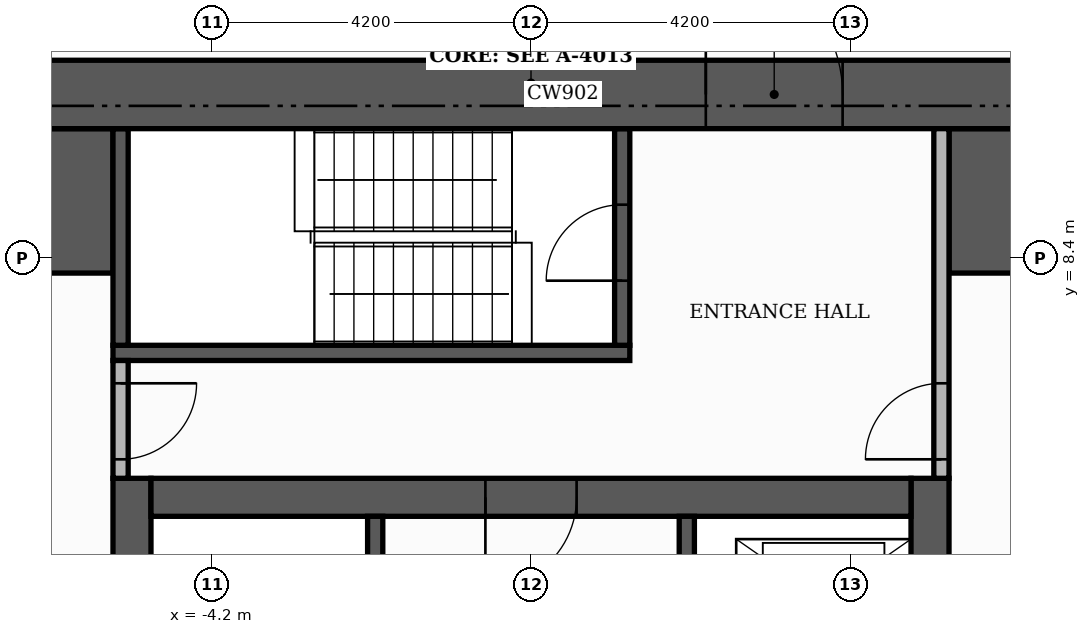
"""IFC4 building model, lengths in metres.
Left out: names, types, materials, properties, quantities, classifications, styles, units other than length and angle.
Written with IfcOpenShell. Run it as: python <this file> out.ifc"""

import sys

from ifc_helpers import new_model, si_unit, direction, frame, frame_2d, origin, place, context, subcontext, project, spatial, rectangle, extrude, element, fill, save


model = new_model("IFC4")
c1 = context("Model", 3, precision=1e-05, world=origin(), true_north=direction((0.0, 1.0)))
c2 = subcontext(c1, "Body", "Model", "MODEL_VIEW")
j1 = project(units=[si_unit("LENGTHUNIT", "METRE"), si_unit("PLANEANGLEUNIT", "RADIAN")], contexts=[c1])
p1 = place(None, origin())
s1 = spatial("IfcSite", under=j1, at=p1, CompositionType="ELEMENT")
p2 = place(p1, origin())
s2 = spatial("IfcBuilding", under=s1, at=p2, CompositionType="ELEMENT")
p3 = place(p2, frame((0.0, 0.0, 83.1)))
s3 = spatial("IfcBuildingStorey", under=s2, at=p3, CompositionType="ELEMENT", Elevation=83.1)
for number, where, z_axis, x_axis in (
    (1, (-5.25, -5.0, 0.0), (0.0, 0.0, 1.0), (0.0, 1.0, 0.0)),
    (2, (5.25, -5.0, 0.0), (0.0, 0.0, 1.0), (0.0, 1.0, 0.0)),
):
    element("IfcWall", number, at=place(p3, frame(where, z_axis=z_axis, x_axis=x_axis)), inside=s3, PredefinedType="SHEAR", context=c2, shape_type="SweptSolid", body=[
        extrude(rectangle(XDim=10.5, YDim=0.5, at=frame_2d((5.25, 0.0))), origin(), (0.0, 0.0, 1.0), 3.48),
    ])
p4 = place(p3, frame((-5.0, 5.25, 0.0), z_axis=(0.0, 0.0, 1.0), x_axis=(1.0, 0.0, 0.0)))
e3 = element("IfcWall", 3, at=p4, inside=s3, PredefinedType="SHEAR", context=c2, shape_type="SweptSolid", body=[
    extrude(rectangle(XDim=10.0, YDim=0.5, at=frame_2d((5.0, 0.0))), origin(), (0.0, 0.0, 1.0), 3.48),
])
p5 = place(p4, frame((4.4, 0.0, 0.0)))
e4 = element("IfcOpeningElement", 4, at=p5, cuts=e3, PredefinedType="OPENING", context=c2, shape_type="SweptSolid", body=[
    extrude(rectangle(XDim=1.2, YDim=2.1, at=frame_2d((0.6, 1.05))), frame((0.0, 0.26, 0.0), z_axis=(0.0, -1.0, 0.0), x_axis=(1.0, 0.0, 0.0)), (0.0, 0.0, 1.0), 0.52),
])
for number, where, z_axis, x_axis in (
    (5, (-10.1, 9.15, 0.0), (0.0, 0.0, 1.0), (1.0, 0.0, 0.0)),
    (6, (5.5, 9.15, 0.0), (0.0, 0.0, 1.0), (1.0, 0.0, 0.0)),
):
    element("IfcWall", number, at=place(p3, frame(where, z_axis=z_axis, x_axis=x_axis)), inside=s3, PredefinedType="SHEAR", context=c2, shape_type="SweptSolid", body=[
        extrude(rectangle(XDim=4.6, YDim=1.9, at=frame_2d((2.3, 0.0))), origin(), (0.0, 0.0, 1.0), 3.48),
    ])
p6 = place(p3, frame((-2.05, -1.4, 0.0), z_axis=(0.0, 0.0, 1.0), x_axis=(0.0, 1.0, 0.0)))
e7 = element("IfcWall", 7, at=p6, inside=s3, PredefinedType="SHEAR", context=c2, shape_type="SweptSolid", body=[
    extrude(rectangle(XDim=6.4, YDim=0.2, at=frame_2d((3.2, 0.0))), origin(), (0.0, 0.0, 1.0), 3.48),
])
p7 = place(p6, frame((0.15, 0.0, 0.0)))
e8 = element("IfcOpeningElement", 8, at=p7, cuts=e7, PredefinedType="OPENING", context=c2, shape_type="SweptSolid", body=[
    extrude(rectangle(XDim=1.0, YDim=2.1, at=frame_2d((0.5, 1.05))), frame((0.0, 0.11, 0.0), z_axis=(0.0, -1.0, 0.0), x_axis=(1.0, 0.0, 0.0)), (0.0, 0.0, 1.0), 0.22),
])
p8 = place(p3, frame((-5.5, 7.15, 0.0), z_axis=(0.0, 0.0, 1.0), x_axis=(1.0, 0.0, 0.0)))
e9 = element("IfcWall", 9, at=p8, inside=s3, PredefinedType="SHEAR", context=c2, shape_type="SweptSolid", body=[
    extrude(rectangle(XDim=6.8, YDim=0.2, at=frame_2d((3.4, 0.0))), origin(), (0.0, 0.0, 1.0), 3.48),
])
p9 = place(p3, frame((-5.4, 7.25, 0.0), z_axis=(0.0, 0.0, 1.0), x_axis=(0.0, 1.0, 0.0)))
e10 = element("IfcWall", 10, at=p9, inside=s3, PredefinedType="SHEAR", context=c2, shape_type="SweptSolid", body=[
    extrude(rectangle(XDim=2.85, YDim=0.2, at=frame_2d((1.425, 0.0))), origin(), (0.0, 0.0, 1.0), 3.48),
])
p10 = place(p3, frame((1.2, 7.25, 0.0), z_axis=(0.0, 0.0, 1.0), x_axis=(0.0, 1.0, 0.0)))
e11 = element("IfcWall", 11, at=p10, inside=s3, PredefinedType="SHEAR", context=c2, shape_type="SweptSolid", body=[
    extrude(rectangle(XDim=2.85, YDim=0.2, at=frame_2d((1.425, 0.0))), origin(), (0.0, 0.0, 1.0), 3.48),
])
p11 = place(p10, frame((0.85, 0.0, 0.0)))
e12 = element("IfcOpeningElement", 12, at=p11, cuts=e11, PredefinedType="OPENING", context=c2, shape_type="SweptSolid", body=[
    extrude(rectangle(XDim=1.0, YDim=2.1, at=frame_2d((0.5, 1.05))), frame((0.0, 0.11, 0.0), z_axis=(0.0, -1.0, 0.0), x_axis=(1.0, 0.0, 0.0)), (0.0, 0.0, 1.0), 0.22),
])
p12 = place(p3, frame((2.05, 1.6, 0.0), z_axis=(0.0, 0.0, 1.0), x_axis=(0.0, 1.0, 0.0)))
e13 = element("IfcWall", 13, at=p12, inside=s3, PredefinedType="SHEAR", context=c2, shape_type="SweptSolid", body=[
    extrude(rectangle(XDim=3.4, YDim=0.2, at=frame_2d((1.7, 0.0))), origin(), (0.0, 0.0, 1.0), 3.48),
])
p13 = place(p12, frame((1.75, 0.0, 0.0)))
e14 = element("IfcOpeningElement", 14, at=p13, cuts=e13, PredefinedType="OPENING", context=c2, shape_type="SweptSolid", body=[
    extrude(rectangle(XDim=1.1, YDim=2.1, at=frame_2d((0.55, 1.05))), frame((0.0, 0.11, 0.0), z_axis=(0.0, -1.0, 0.0), x_axis=(1.0, 0.0, 0.0)), (0.0, 0.0, 1.0), 0.22),
])
p14 = place(p12, frame((0.15, 0.0, 0.0)))
e15 = element("IfcOpeningElement", 15, at=p14, cuts=e13, PredefinedType="OPENING", context=c2, shape_type="SweptSolid", body=[
    extrude(rectangle(XDim=0.8, YDim=2.1, at=frame_2d((0.4, 1.05))), frame((0.0, 0.11, 0.0), z_axis=(0.0, -1.0, 0.0), x_axis=(1.0, 0.0, 0.0)), (0.0, 0.0, 1.0), 0.22),
])
p15 = place(p3, frame((-11.0, 10.55, 0.0), z_axis=(0.0, 0.0, 1.0), x_axis=(1.0, 0.0, 0.0)))
e16 = element("IfcWall", 16, at=p15, inside=s3, PredefinedType="SHEAR", context=c2, shape_type="SweptSolid", body=[
    extrude(rectangle(XDim=22.0, YDim=0.9, at=frame_2d((11.0, 0.0))), origin(), (0.0, 0.0, 1.0), 3.48),
])
p16 = place(p15, frame((13.3, 0.0, 0.0)))
e17 = element("IfcOpeningElement", 17, at=p16, cuts=e16, PredefinedType="OPENING", context=c2, shape_type="SweptSolid", body=[
    extrude(rectangle(XDim=1.8, YDim=2.2, at=frame_2d((0.9, 1.1))), frame((0.0, 0.46, 0.0), z_axis=(0.0, -1.0, 0.0), x_axis=(1.0, 0.0, 0.0)), (0.0, 0.0, 1.0), 0.92),
])
p17 = place(p3, frame((-5.4, 5.5, 0.0), z_axis=(0.0, 0.0, 1.0), x_axis=(0.0, 1.0, 0.0)))
e18 = element("IfcWall", 18, at=p17, inside=s3, PredefinedType="PARTITIONING", context=c2, shape_type="SweptSolid", body=[
    extrude(rectangle(XDim=1.55, YDim=0.2, at=frame_2d((0.775, 0.0))), origin(), (0.0, 0.0, 1.0), 3.48),
])
p18 = place(p17, frame((0.25, 0.0, 0.0)))
e19 = element("IfcOpeningElement", 19, at=p18, cuts=e18, PredefinedType="OPENING", context=c2, shape_type="SweptSolid", body=[
    extrude(rectangle(XDim=1.0, YDim=2.1, at=frame_2d((0.5, 1.05))), frame((0.0, 0.11, 0.0), z_axis=(0.0, -1.0, 0.0), x_axis=(1.0, 0.0, 0.0)), (0.0, 0.0, 1.0), 0.22),
])
p19 = place(p3, frame((5.4, 5.5, 0.0), z_axis=(0.0, 0.0, 1.0), x_axis=(0.0, 1.0, 0.0)))
e20 = element("IfcWall", 20, at=p19, inside=s3, PredefinedType="PARTITIONING", context=c2, shape_type="SweptSolid", body=[
    extrude(rectangle(XDim=4.6, YDim=0.2, at=frame_2d((2.3, 0.0))), origin(), (0.0, 0.0, 1.0), 3.48),
])
p20 = place(p19, frame((0.25, 0.0, 0.0)))
e21 = element("IfcOpeningElement", 21, at=p20, cuts=e20, PredefinedType="OPENING", context=c2, shape_type="SweptSolid", body=[
    extrude(rectangle(XDim=1.0, YDim=2.1, at=frame_2d((0.5, 1.05))), frame((0.0, 0.11, 0.0), z_axis=(0.0, -1.0, 0.0), x_axis=(1.0, 0.0, 0.0)), (0.0, 0.0, 1.0), 0.22),
])
p21 = place(p5, frame((1.2, 0.0, 0.0), z_axis=(0.0, 0.0, 1.0), x_axis=(-1.0, 0.0, 0.0)))
e22 = element("IfcDoor", 22, at=p21, inside=s3, OperationType="SINGLE_SWING_LEFT", PredefinedType="DOOR", context=c2, shape_type="SweptSolid", body=[
    extrude(rectangle(XDim=1.2, YDim=2.1, at=frame_2d((0.6, 1.05))), frame((0.0, 0.025, 0.0), z_axis=(0.0, -1.0, 0.0), x_axis=(1.0, 0.0, 0.0)), (0.0, 0.0, 1.0), 0.05),
])
fill(e4, e22)
p22 = place(p11, origin())
e23 = element("IfcDoor", 23, at=p22, inside=s3, OperationType="SINGLE_SWING_LEFT", PredefinedType="DOOR", context=c2, shape_type="SweptSolid", body=[
    extrude(rectangle(XDim=1.0, YDim=2.1, at=frame_2d((0.5, 1.05))), frame((0.0, 0.025, 0.0), z_axis=(0.0, -1.0, 0.0), x_axis=(1.0, 0.0, 0.0)), (0.0, 0.0, 1.0), 0.05),
])
fill(e12, e23)
p23 = place(p18, frame((1.0, 0.0, 0.0), z_axis=(0.0, 0.0, 1.0), x_axis=(-1.0, 0.0, 0.0)))
e24 = element("IfcDoor", 24, at=p23, inside=s3, OperationType="SINGLE_SWING_RIGHT", PredefinedType="DOOR", context=c2, shape_type="SweptSolid", body=[
    extrude(rectangle(XDim=1.0, YDim=2.1, at=frame_2d((0.5, 1.05))), frame((0.0, 0.025, 0.0), z_axis=(0.0, -1.0, 0.0), x_axis=(1.0, 0.0, 0.0)), (0.0, 0.0, 1.0), 0.05),
])
fill(e19, e24)
p24 = place(p20, origin())
e25 = element("IfcDoor", 25, at=p24, inside=s3, OperationType="SINGLE_SWING_LEFT", PredefinedType="DOOR", context=c2, shape_type="SweptSolid", body=[
    extrude(rectangle(XDim=1.0, YDim=2.1, at=frame_2d((0.5, 1.05))), frame((0.0, 0.025, 0.0), z_axis=(0.0, -1.0, 0.0), x_axis=(1.0, 0.0, 0.0)), (0.0, 0.0, 1.0), 0.05),
])
fill(e21, e25)
p25 = place(p16, origin())
e26 = element("IfcDoor", 26, at=p25, inside=s3, OperationType="DOUBLE_DOOR_SINGLE_SWING", PredefinedType="DOOR", context=c2, shape_type="SweptSolid", body=[
    extrude(rectangle(XDim=1.8, YDim=2.2, at=frame_2d((0.9, 1.1))), frame((0.0, 0.025, 0.0), z_axis=(0.0, -1.0, 0.0), x_axis=(1.0, 0.0, 0.0)), (0.0, 0.0, 1.0), 0.05),
])
fill(e17, e26)
save(model, sys.argv[1])
